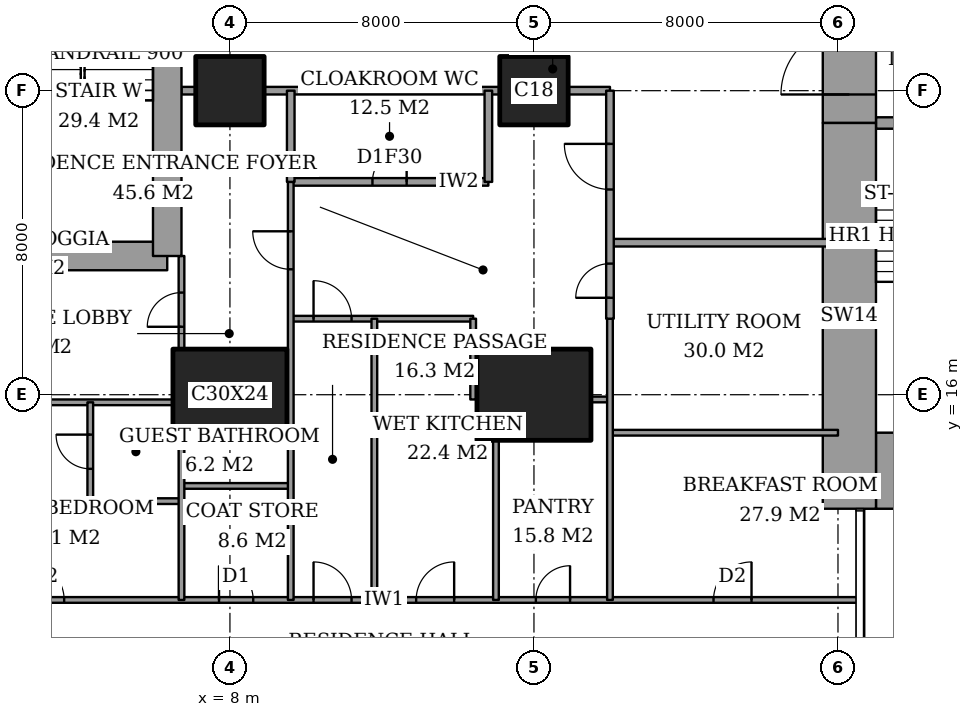
"""IFC4 building model, lengths in metres.
Left out: names, types, materials, properties, quantities, classifications, styles, units other than length and angle.
Written with IfcOpenShell. Run it as: python <this file> out.ifc"""

import sys

from ifc_helpers import new_model, si_unit, direction, frame, frame_2d, origin, origin_2d, place, context, subcontext, project, spatial, rectangle, extrude, element, fill, save


model = new_model("IFC4")
c1 = context("Model", 3, precision=1e-05, world=origin(), true_north=direction((0.0, 1.0)))
c2 = subcontext(c1, "Body", "Model", "MODEL_VIEW")
j1 = project(units=[si_unit("LENGTHUNIT", "METRE"), si_unit("PLANEANGLEUNIT", "RADIAN")], contexts=[c1])
p1 = place(None, origin())
s1 = spatial("IfcSite", under=j1, at=p1, CompositionType="ELEMENT")
p2 = place(p1, origin())
s2 = spatial("IfcBuilding", under=s1, at=p2, CompositionType="ELEMENT")
p3 = place(p2, frame((0.0, 0.0, 214.6)))
s3 = spatial("IfcBuildingStorey", under=s2, at=p3, CompositionType="ELEMENT", Elevation=214.6)
p4 = place(p3, frame((8.0, 16.0, 0.0), z_axis=(0.0, 0.0, 1.0), x_axis=(1.0, 0.0, 0.0)))
e1 = element("IfcColumn", 1, at=p4, inside=s3, PredefinedType="COLUMN", context=c2, shape_type="SweptSolid", body=[
    extrude(rectangle(XDim=3.0, YDim=2.4, at=origin_2d()), origin(), (0.0, 0.0, 1.0), 3.6),
])
p5 = place(p3, frame((8.0, 24.0, 0.0), z_axis=(0.0, 0.0, 1.0), x_axis=(1.0, 0.0, 0.0)))
e2 = element("IfcColumn", 2, at=p5, inside=s3, PredefinedType="COLUMN", context=c2, shape_type="SweptSolid", body=[
    extrude(rectangle(XDim=1.8, YDim=1.8, at=origin_2d()), origin(), (0.0, 0.0, 1.0), 3.6),
])
p6 = place(p3, frame((16.0, 16.0, 0.0), z_axis=(0.0, 0.0, 1.0), x_axis=(1.0, 0.0, 0.0)))
e3 = element("IfcColumn", 3, at=p6, inside=s3, PredefinedType="COLUMN", context=c2, shape_type="SweptSolid", body=[
    extrude(rectangle(XDim=3.0, YDim=2.4, at=origin_2d()), origin(), (0.0, 0.0, 1.0), 3.6),
])
p7 = place(p3, frame((16.0, 24.0, 0.0), z_axis=(0.0, 0.0, 1.0), x_axis=(1.0, 0.0, 0.0)))
e4 = element("IfcColumn", 4, at=p7, inside=s3, PredefinedType="COLUMN", context=c2, shape_type="SweptSolid", body=[
    extrude(rectangle(XDim=1.8, YDim=1.8, at=origin_2d()), origin(), (0.0, 0.0, 1.0), 3.6),
])
p8 = place(p3, frame((25.0, 14.0, 0.0), z_axis=(0.0, 0.0, 1.0), x_axis=(1.0, 0.0, 0.0)))
e5 = element("IfcWall", 5, at=p8, inside=s3, PredefinedType="SHEAR", context=c2, shape_type="SweptSolid", body=[
    extrude(rectangle(XDim=3.15, YDim=2.0, at=frame_2d((1.575, 0.0))), origin(), (0.0, 0.0, 1.0), 3.6),
])
p9 = place(p3, frame((24.3, 13.0, 0.0), z_axis=(0.0, 0.0, 1.0), x_axis=(0.0, 1.0, 0.0)))
e6 = element("IfcWall", 6, at=p9, inside=s3, PredefinedType="SHEAR", context=c2, shape_type="SweptSolid", body=[
    extrude(rectangle(XDim=10.15, YDim=1.4, at=frame_2d((5.075, 0.0))), origin(), (0.0, 0.0, 1.0), 3.6),
])
p10 = place(p3, frame((24.3, 23.15, 0.0), z_axis=(0.0, 0.0, 1.0), x_axis=(0.0, 1.0, 0.0)))
e7 = element("IfcWall", 7, at=p10, inside=s3, PredefinedType="SHEAR", context=c2, shape_type="SweptSolid", body=[
    extrude(rectangle(XDim=11.85, YDim=1.4, at=frame_2d((5.925, 0.0))), origin(), (0.0, 0.0, 1.0), 3.6),
])
p11 = place(p10, frame((0.75, 0.0, 0.0)))
e8 = element("IfcOpeningElement", 8, at=p11, cuts=e7, PredefinedType="OPENING", context=c2, shape_type="SweptSolid", body=[
    extrude(rectangle(XDim=1.8, YDim=2.4, at=frame_2d((0.9, 1.2))), frame((0.0, 0.71, 0.0), z_axis=(0.0, -1.0, 0.0), x_axis=(1.0, 0.0, 0.0)), (0.0, 0.0, 1.0), 1.42),
])
p12 = place(p3, frame((25.0, 23.15, 0.0), z_axis=(0.0, 0.0, 1.0), x_axis=(1.0, 0.0, 0.0)))
e9 = element("IfcWall", 9, at=p12, inside=s3, PredefinedType="SHEAR", context=c2, shape_type="SweptSolid", body=[
    extrude(rectangle(XDim=3.15, YDim=0.3, at=frame_2d((1.575, 0.0))), origin(), (0.0, 0.0, 1.0), 3.6),
])
p13 = place(p12, frame((0.6, 0.0, 0.0)))
e10 = element("IfcOpeningElement", 10, at=p13, cuts=e9, PredefinedType="OPENING", context=c2, shape_type="SweptSolid", body=[
    extrude(rectangle(XDim=1.0, YDim=2.1, at=frame_2d((0.5, 1.05))), frame((0.0, 0.16, 0.0), z_axis=(0.0, -1.0, 0.0), x_axis=(1.0, 0.0, 0.0)), (0.0, 0.0, 1.0), 0.32),
])
p14 = place(p3, frame((1.9, 19.65, 0.0), z_axis=(0.0, 0.0, 1.0), x_axis=(1.0, 0.0, 0.0)))
e11 = element("IfcWall", 11, at=p14, inside=s3, PredefinedType="SHEAR", context=c2, shape_type="SweptSolid", body=[
    extrude(rectangle(XDim=4.45, YDim=0.75, at=frame_2d((2.225, 0.0))), origin(), (0.0, 0.0, 1.0), 3.6),
])
p15 = place(p3, frame((6.35, 19.65, 0.0), z_axis=(0.0, 0.0, 1.0), x_axis=(0.0, 1.0, 0.0)))
e12 = element("IfcWall", 12, at=p15, inside=s3, PredefinedType="SHEAR", context=c2, shape_type="SweptSolid", body=[
    extrude(rectangle(XDim=8.7, YDim=0.75, at=frame_2d((4.35, 0.0))), origin(), (0.0, 0.0, 1.0), 3.6),
])
p16 = place(p15, frame((6.725, 0.0, 0.0)))
e13 = element("IfcOpeningElement", 13, at=p16, cuts=e12, PredefinedType="OPENING", context=c2, shape_type="SweptSolid", body=[
    extrude(rectangle(XDim=1.0, YDim=2.1, at=frame_2d((0.5, 1.05))), frame((0.0, 0.385, 0.0), z_axis=(0.0, -1.0, 0.0), x_axis=(1.0, 0.0, 0.0)), (0.0, 0.0, 1.0), 0.77),
])
p17 = place(p3, frame((-0.45, 10.6, 0.0), z_axis=(0.0, 0.0, 1.0), x_axis=(1.0, 0.0, 0.0)))
e14 = element("IfcWall", 14, at=p17, inside=s3, PredefinedType="PARTITIONING", context=c2, shape_type="SweptSolid", body=[
    extrude(rectangle(XDim=25.011, YDim=0.15, at=frame_2d((12.505, 0.0))), origin(), (0.0, 0.0, 1.0), 3.35),
])
p18 = place(p17, frame((10.65, 0.0, 0.0)))
e15 = element("IfcOpeningElement", 15, at=p18, cuts=e14, PredefinedType="OPENING", context=c2, shape_type="SweptSolid", body=[
    extrude(rectangle(XDim=1.0, YDim=2.1, at=frame_2d((0.5, 1.05))), frame((0.0, 0.085, 0.0), z_axis=(0.0, -1.0, 0.0), x_axis=(1.0, 0.0, 0.0)), (0.0, 0.0, 1.0), 0.17),
])
p19 = place(p17, frame((3.087, 0.0, 0.0)))
e16 = element("IfcOpeningElement", 16, at=p19, cuts=e14, PredefinedType="OPENING", context=c2, shape_type="SweptSolid", body=[
    extrude(rectangle(XDim=1.0, YDim=2.1, at=frame_2d((0.5, 1.05))), frame((0.0, 0.085, 0.0), z_axis=(0.0, -1.0, 0.0), x_axis=(1.0, 0.0, 0.0)), (0.0, 0.0, 1.0), 0.17),
])
p20 = place(p17, frame((8.163, 0.0, 0.0)))
e17 = element("IfcOpeningElement", 17, at=p20, cuts=e14, PredefinedType="OPENING", context=c2, shape_type="SweptSolid", body=[
    extrude(rectangle(XDim=0.9, YDim=2.1, at=frame_2d((0.45, 1.05))), frame((0.0, 0.085, 0.0), z_axis=(0.0, -1.0, 0.0), x_axis=(1.0, 0.0, 0.0)), (0.0, 0.0, 1.0), 0.17),
])
p21 = place(p17, frame((13.35, 0.0, 0.0)))
e18 = element("IfcOpeningElement", 18, at=p21, cuts=e14, PredefinedType="OPENING", context=c2, shape_type="SweptSolid", body=[
    extrude(rectangle(XDim=1.0, YDim=2.1, at=frame_2d((0.5, 1.05))), frame((0.0, 0.085, 0.0), z_axis=(0.0, -1.0, 0.0), x_axis=(1.0, 0.0, 0.0)), (0.0, 0.0, 1.0), 0.17),
])
p22 = place(p17, frame((16.5, 0.0, 0.0)))
e19 = element("IfcOpeningElement", 19, at=p22, cuts=e14, PredefinedType="OPENING", context=c2, shape_type="SweptSolid", body=[
    extrude(rectangle(XDim=0.9, YDim=2.1, at=frame_2d((0.45, 1.05))), frame((0.0, 0.085, 0.0), z_axis=(0.0, -1.0, 0.0), x_axis=(1.0, 0.0, 0.0)), (0.0, 0.0, 1.0), 0.17),
])
p23 = place(p17, frame((21.175, 0.0, 0.0)))
e20 = element("IfcOpeningElement", 20, at=p23, cuts=e14, PredefinedType="OPENING", context=c2, shape_type="SweptSolid", body=[
    extrude(rectangle(XDim=1.0, YDim=2.1, at=frame_2d((0.5, 1.05))), frame((0.0, 0.085, 0.0), z_axis=(0.0, -1.0, 0.0), x_axis=(1.0, 0.0, 0.0)), (0.0, 0.0, 1.0), 0.17),
])
p24 = place(p3, frame((4.325, 13.2, 0.0), z_axis=(0.0, 0.0, 1.0), x_axis=(1.0, 0.0, 0.0)))
e21 = element("IfcWall", 21, at=p24, inside=s3, PredefinedType="PARTITIONING", context=c2, shape_type="SweptSolid", body=[
    extrude(rectangle(XDim=2.4, YDim=0.15, at=frame_2d((1.2, 0.0))), origin(), (0.0, 0.0, 1.0), 3.35),
])
p25 = place(p3, frame((6.725, 13.6, 0.0), z_axis=(0.0, 0.0, 1.0), x_axis=(1.0, 0.0, 0.0)))
e22 = element("IfcWall", 22, at=p25, inside=s3, PredefinedType="PARTITIONING", context=c2, shape_type="SweptSolid", body=[
    extrude(rectangle(XDim=2.875, YDim=0.15, at=frame_2d((1.438, 0.0))), origin(), (0.0, 0.0, 1.0), 3.35),
])
p26 = place(p3, frame((18.0, 15.0, 0.0), z_axis=(0.0, 0.0, 1.0), x_axis=(1.0, 0.0, 0.0)))
e23 = element("IfcWall", 23, at=p26, inside=s3, PredefinedType="PARTITIONING", context=c2, shape_type="SweptSolid", body=[
    extrude(rectangle(XDim=6.0, YDim=0.15, at=frame_2d((3.0, 0.0))), origin(), (0.0, 0.0, 1.0), 3.35),
])
p27 = place(p3, frame((1.25, 15.8, 0.0), z_axis=(0.0, 0.0, 1.0), x_axis=(1.0, 0.0, 0.0)))
e24 = element("IfcWall", 24, at=p27, inside=s3, PredefinedType="PARTITIONING", context=c2, shape_type="SweptSolid", body=[
    extrude(rectangle(XDim=5.25, YDim=0.15, at=frame_2d((2.625, 0.0))), origin(), (0.0, 0.0, 1.0), 3.35),
])
p28 = place(p3, frame((17.5, 15.875, 0.0), z_axis=(0.0, 0.0, 1.0), x_axis=(1.0, 0.0, 0.0)))
e25 = element("IfcWall", 25, at=p28, inside=s3, PredefinedType="PARTITIONING", context=c2, shape_type="SweptSolid", body=[
    extrude(rectangle(XDim=0.5, YDim=0.15, at=frame_2d((0.25, 0.0))), origin(), (0.0, 0.0, 1.0), 2.634),
])
p29 = place(p3, frame((9.6, 18.0, 0.0), z_axis=(0.0, 0.0, 1.0), x_axis=(1.0, 0.0, 0.0)))
e26 = element("IfcWall", 26, at=p29, inside=s3, PredefinedType="PARTITIONING", context=c2, shape_type="SweptSolid", body=[
    extrude(rectangle(XDim=4.8, YDim=0.15, at=frame_2d((2.4, 0.0))), origin(), (0.0, 0.0, 1.0), 3.35),
])
p30 = place(p29, frame((0.6, 0.0, 0.0)))
e27 = element("IfcOpeningElement", 27, at=p30, cuts=e26, PredefinedType="OPENING", context=c2, shape_type="SweptSolid", body=[
    extrude(rectangle(XDim=1.0, YDim=2.1, at=frame_2d((0.5, 1.05))), frame((0.0, 0.085, 0.0), z_axis=(0.0, -1.0, 0.0), x_axis=(1.0, 0.0, 0.0)), (0.0, 0.0, 1.0), 0.17),
])
p31 = place(p3, frame((18.0, 20.0, 0.0), z_axis=(0.0, 0.0, 1.0), x_axis=(1.0, 0.0, 0.0)))
e28 = element("IfcWall", 28, at=p31, inside=s3, PredefinedType="PARTITIONING", context=c2, shape_type="SweptSolid", body=[
    extrude(rectangle(XDim=6.0, YDim=0.2, at=frame_2d((3.0, 0.0))), origin(), (0.0, 0.0, 1.0), 3.35),
])
p32 = place(p3, frame((9.6, 21.6, 0.0), z_axis=(0.0, 0.0, 1.0), x_axis=(1.0, 0.0, 0.0)))
e29 = element("IfcWall", 29, at=p32, inside=s3, PredefinedType="PARTITIONING", context=c2, shape_type="SweptSolid", body=[
    extrude(rectangle(XDim=5.2, YDim=0.2, at=frame_2d((2.6, 0.0))), origin(), (0.0, 0.0, 1.0), 3.35),
])
p33 = place(p32, frame((2.15, 0.0, 0.0)))
e30 = element("IfcOpeningElement", 30, at=p33, cuts=e29, PredefinedType="OPENING", context=c2, shape_type="SweptSolid", body=[
    extrude(rectangle(XDim=0.9, YDim=2.1, at=frame_2d((0.45, 1.05))), frame((0.0, 0.11, 0.0), z_axis=(0.0, -1.0, 0.0), x_axis=(1.0, 0.0, 0.0)), (0.0, 0.0, 1.0), 0.22),
])
p34 = place(p3, frame((6.725, 24.0, 0.0), z_axis=(0.0, 0.0, 1.0), x_axis=(1.0, 0.0, 0.0)))
e31 = element("IfcWall", 31, at=p34, inside=s3, PredefinedType="PARTITIONING", context=c2, shape_type="SweptSolid", body=[
    extrude(rectangle(XDim=0.375, YDim=0.2, at=frame_2d((0.188, 0.0))), origin(), (0.0, 0.0, 1.0), 3.35),
])
p35 = place(p3, frame((8.9, 24.0, 0.0), z_axis=(0.0, 0.0, 1.0), x_axis=(1.0, 0.0, 0.0)))
e32 = element("IfcWall", 32, at=p35, inside=s3, PredefinedType="PARTITIONING", context=c2, shape_type="SweptSolid", body=[
    extrude(rectangle(XDim=6.2, YDim=0.2, at=frame_2d((3.1, 0.0))), origin(), (0.0, 0.0, 1.0), 3.35),
])
p36 = place(p3, frame((16.9, 24.0, 0.0), z_axis=(0.0, 0.0, 1.0), x_axis=(1.0, 0.0, 0.0)))
e33 = element("IfcWall", 33, at=p36, inside=s3, PredefinedType="PARTITIONING", context=c2, shape_type="SweptSolid", body=[
    extrude(rectangle(XDim=1.1, YDim=0.2, at=frame_2d((0.55, 0.0))), origin(), (0.0, 0.0, 1.0), 3.35),
])
p37 = place(p3, frame((4.325, 13.2, 0.0), z_axis=(0.0, 0.0, 1.0), x_axis=(0.0, 1.0, 0.0)))
e34 = element("IfcWall", 34, at=p37, inside=s3, PredefinedType="PARTITIONING", context=c2, shape_type="SweptSolid", body=[
    extrude(rectangle(XDim=2.6, YDim=0.15, at=frame_2d((1.3, 0.0))), origin(), (0.0, 0.0, 1.0), 3.35),
])
p38 = place(p37, frame((0.85, 0.0, 0.0)))
e35 = element("IfcOpeningElement", 35, at=p38, cuts=e34, PredefinedType="OPENING", context=c2, shape_type="SweptSolid", body=[
    extrude(rectangle(XDim=0.9, YDim=2.1, at=frame_2d((0.45, 1.05))), frame((0.0, 0.085, 0.0), z_axis=(0.0, -1.0, 0.0), x_axis=(1.0, 0.0, 0.0)), (0.0, 0.0, 1.0), 0.17),
])
p39 = place(p3, frame((6.725, 10.6, 0.0), z_axis=(0.0, 0.0, 1.0), x_axis=(0.0, 1.0, 0.0)))
e36 = element("IfcWall", 36, at=p39, inside=s3, PredefinedType="PARTITIONING", context=c2, shape_type="SweptSolid", body=[
    extrude(rectangle(XDim=4.2, YDim=0.15, at=frame_2d((2.1, 0.0))), origin(), (0.0, 0.0, 1.0), 3.35),
])
p40 = place(p3, frame((6.725, 17.2, 0.0), z_axis=(0.0, 0.0, 1.0), x_axis=(0.0, 1.0, 0.0)))
e37 = element("IfcWall", 37, at=p40, inside=s3, PredefinedType="PARTITIONING", context=c2, shape_type="SweptSolid", body=[
    extrude(rectangle(XDim=2.45, YDim=0.15, at=frame_2d((1.225, 0.0))), origin(), (0.0, 0.0, 1.0), 3.35),
])
p41 = place(p40, frame((0.587, 0.0, 0.0)))
e38 = element("IfcOpeningElement", 38, at=p41, cuts=e37, PredefinedType="OPENING", context=c2, shape_type="SweptSolid", body=[
    extrude(rectangle(XDim=0.9, YDim=2.1, at=frame_2d((0.45, 1.05))), frame((0.0, 0.085, 0.0), z_axis=(0.0, -1.0, 0.0), x_axis=(1.0, 0.0, 0.0)), (0.0, 0.0, 1.0), 0.17),
])
p42 = place(p3, frame((9.6, 21.6, 0.0), z_axis=(0.0, 0.0, 1.0), x_axis=(0.0, 1.0, 0.0)))
e39 = element("IfcWall", 39, at=p42, inside=s3, PredefinedType="PARTITIONING", context=c2, shape_type="SweptSolid", body=[
    extrude(rectangle(XDim=2.4, YDim=0.2, at=frame_2d((1.2, 0.0))), origin(), (0.0, 0.0, 1.0), 3.35),
])
p43 = place(p3, frame((9.6, 10.6, 0.0), z_axis=(0.0, 0.0, 1.0), x_axis=(0.0, 1.0, 0.0)))
e40 = element("IfcWall", 40, at=p43, inside=s3, PredefinedType="PARTITIONING", context=c2, shape_type="SweptSolid", body=[
    extrude(rectangle(XDim=11.0, YDim=0.15, at=frame_2d((5.5, 0.0))), origin(), (0.0, 0.0, 1.0), 3.35),
])
p44 = place(p43, frame((8.7, 0.0, 0.0)))
e41 = element("IfcOpeningElement", 41, at=p44, cuts=e40, PredefinedType="OPENING", context=c2, shape_type="SweptSolid", body=[
    extrude(rectangle(XDim=1.0, YDim=2.1, at=frame_2d((0.5, 1.05))), frame((0.0, 0.085, 0.0), z_axis=(0.0, -1.0, 0.0), x_axis=(1.0, 0.0, 0.0)), (0.0, 0.0, 1.0), 0.17),
])
p45 = place(p3, frame((11.8, 10.6, 0.0), z_axis=(0.0, 0.0, 1.0), x_axis=(0.0, 1.0, 0.0)))
e42 = element("IfcWall", 42, at=p45, inside=s3, PredefinedType="PARTITIONING", context=c2, shape_type="SweptSolid", body=[
    extrude(rectangle(XDim=7.4, YDim=0.15, at=frame_2d((3.7, 0.0))), origin(), (0.0, 0.0, 1.0), 3.35),
])
p46 = place(p3, frame((14.4, 15.875, 0.0), z_axis=(0.0, 0.0, 1.0), x_axis=(0.0, 1.0, 0.0)))
e43 = element("IfcWall", 43, at=p46, inside=s3, PredefinedType="PARTITIONING", context=c2, shape_type="SweptSolid", body=[
    extrude(rectangle(XDim=2.125, YDim=0.15, at=frame_2d((1.062, 0.0))), origin(), (0.0, 0.0, 1.0), 3.35),
])
p47 = place(p3, frame((14.8, 21.6, 0.0), z_axis=(0.0, 0.0, 1.0), x_axis=(0.0, 1.0, 0.0)))
e44 = element("IfcWall", 44, at=p47, inside=s3, PredefinedType="PARTITIONING", context=c2, shape_type="SweptSolid", body=[
    extrude(rectangle(XDim=2.4, YDim=0.2, at=frame_2d((1.2, 0.0))), origin(), (0.0, 0.0, 1.0), 3.35),
])
p48 = place(p3, frame((15.0, 10.6, 0.0), z_axis=(0.0, 0.0, 1.0), x_axis=(0.0, 1.0, 0.0)))
e45 = element("IfcWall", 45, at=p48, inside=s3, PredefinedType="PARTITIONING", context=c2, shape_type="SweptSolid", body=[
    extrude(rectangle(XDim=4.2, YDim=0.15, at=frame_2d((2.1, 0.0))), origin(), (0.0, 0.0, 1.0), 3.35),
])
p49 = place(p3, frame((18.0, 18.0, 0.0), z_axis=(0.0, 0.0, 1.0), x_axis=(0.0, 1.0, 0.0)))
e46 = element("IfcWall", 46, at=p49, inside=s3, PredefinedType="PARTITIONING", context=c2, shape_type="SweptSolid", body=[
    extrude(rectangle(XDim=6.0, YDim=0.2, at=frame_2d((3.0, 0.0))), origin(), (0.0, 0.0, 1.0), 3.35),
])
p50 = place(p49, frame((3.4, 0.0, 0.0)))
e47 = element("IfcOpeningElement", 47, at=p50, cuts=e46, PredefinedType="OPENING", context=c2, shape_type="SweptSolid", body=[
    extrude(rectangle(XDim=1.2, YDim=2.4, at=frame_2d((0.6, 1.2))), frame((0.0, 0.11, 0.0), z_axis=(0.0, -1.0, 0.0), x_axis=(1.0, 0.0, 0.0)), (0.0, 0.0, 1.0), 0.22),
])
p51 = place(p49, frame((0.55, 0.0, 0.0)))
e48 = element("IfcOpeningElement", 48, at=p51, cuts=e46, PredefinedType="OPENING", context=c2, shape_type="SweptSolid", body=[
    extrude(rectangle(XDim=0.9, YDim=2.1, at=frame_2d((0.45, 1.05))), frame((0.0, 0.11, 0.0), z_axis=(0.0, -1.0, 0.0), x_axis=(1.0, 0.0, 0.0)), (0.0, 0.0, 1.0), 0.22),
])
p52 = place(p3, frame((18.0, 10.6, 0.0), z_axis=(0.0, 0.0, 1.0), x_axis=(0.0, 1.0, 0.0)))
e49 = element("IfcWall", 49, at=p52, inside=s3, PredefinedType="PARTITIONING", context=c2, shape_type="SweptSolid", body=[
    extrude(rectangle(XDim=7.4, YDim=0.15, at=frame_2d((3.7, 0.0))), origin(), (0.0, 0.0, 1.0), 3.35),
])
p53 = place(p18, origin())
e50 = element("IfcDoor", 50, at=p53, inside=s3, OperationType="SINGLE_SWING_RIGHT", PredefinedType="DOOR", context=c2, shape_type="SweptSolid", body=[
    extrude(rectangle(XDim=1.0, YDim=2.1, at=frame_2d((0.5, 1.05))), frame((0.0, 0.025, 0.0), z_axis=(0.0, -1.0, 0.0), x_axis=(1.0, 0.0, 0.0)), (0.0, 0.0, 1.0), 0.05),
])
fill(e15, e50)
p54 = place(p38, origin())
e51 = element("IfcDoor", 51, at=p54, inside=s3, OperationType="SINGLE_SWING_LEFT", PredefinedType="DOOR", context=c2, shape_type="SweptSolid", body=[
    extrude(rectangle(XDim=0.9, YDim=2.1, at=frame_2d((0.45, 1.05))), frame((0.0, 0.025, 0.0), z_axis=(0.0, -1.0, 0.0), x_axis=(1.0, 0.0, 0.0)), (0.0, 0.0, 1.0), 0.05),
])
fill(e35, e51)
p55 = place(p19, origin())
e52 = element("IfcDoor", 52, at=p55, inside=s3, OperationType="SINGLE_SWING_RIGHT", PredefinedType="DOOR", context=c2, shape_type="SweptSolid", body=[
    extrude(rectangle(XDim=1.0, YDim=2.1, at=frame_2d((0.5, 1.05))), frame((0.0, 0.025, 0.0), z_axis=(0.0, -1.0, 0.0), x_axis=(1.0, 0.0, 0.0)), (0.0, 0.0, 1.0), 0.05),
])
fill(e16, e52)
p56 = place(p41, origin())
e53 = element("IfcDoor", 53, at=p56, inside=s3, OperationType="SINGLE_SWING_RIGHT", PredefinedType="DOOR", context=c2, shape_type="SweptSolid", body=[
    extrude(rectangle(XDim=0.9, YDim=2.1, at=frame_2d((0.45, 1.05))), frame((0.0, 0.025, 0.0), z_axis=(0.0, -1.0, 0.0), x_axis=(1.0, 0.0, 0.0)), (0.0, 0.0, 1.0), 0.05),
])
fill(e38, e53)
p57 = place(p20, origin())
e54 = element("IfcDoor", 54, at=p57, inside=s3, OperationType="SINGLE_SWING_RIGHT", PredefinedType="DOOR", context=c2, shape_type="SweptSolid", body=[
    extrude(rectangle(XDim=0.9, YDim=2.1, at=frame_2d((0.45, 1.05))), frame((0.0, 0.025, 0.0), z_axis=(0.0, -1.0, 0.0), x_axis=(1.0, 0.0, 0.0)), (0.0, 0.0, 1.0), 0.05),
])
fill(e17, e54)
p58 = place(p44, origin())
e55 = element("IfcDoor", 55, at=p58, inside=s3, OperationType="SINGLE_SWING_LEFT", PredefinedType="DOOR", context=c2, shape_type="SweptSolid", body=[
    extrude(rectangle(XDim=1.0, YDim=2.1, at=frame_2d((0.5, 1.05))), frame((0.0, 0.025, 0.0), z_axis=(0.0, -1.0, 0.0), x_axis=(1.0, 0.0, 0.0)), (0.0, 0.0, 1.0), 0.05),
])
fill(e41, e55)
p59 = place(p33, origin())
e56 = element("IfcDoor", 56, at=p59, inside=s3, OperationType="SINGLE_SWING_LEFT", PredefinedType="DOOR", context=c2, shape_type="SweptSolid", body=[
    extrude(rectangle(XDim=0.9, YDim=2.1, at=frame_2d((0.45, 1.05))), frame((0.0, 0.025, 0.0), z_axis=(0.0, -1.0, 0.0), x_axis=(1.0, 0.0, 0.0)), (0.0, 0.0, 1.0), 0.05),
])
fill(e30, e56)
p60 = place(p50, origin())
e57 = element("IfcDoor", 57, at=p60, inside=s3, OperationType="SINGLE_SWING_LEFT", PredefinedType="DOOR", context=c2, shape_type="SweptSolid", body=[
    extrude(rectangle(XDim=1.2, YDim=2.4, at=frame_2d((0.6, 1.2))), frame((0.0, 0.025, 0.0), z_axis=(0.0, -1.0, 0.0), x_axis=(1.0, 0.0, 0.0)), (0.0, 0.0, 1.0), 0.05),
])
fill(e47, e57)
p61 = place(p30, origin())
e58 = element("IfcDoor", 58, at=p61, inside=s3, OperationType="SINGLE_SWING_RIGHT", PredefinedType="DOOR", context=c2, shape_type="SweptSolid", body=[
    extrude(rectangle(XDim=1.0, YDim=2.1, at=frame_2d((0.5, 1.05))), frame((0.0, 0.025, 0.0), z_axis=(0.0, -1.0, 0.0), x_axis=(1.0, 0.0, 0.0)), (0.0, 0.0, 1.0), 0.05),
])
fill(e27, e58)
p62 = place(p21, origin())
e59 = element("IfcDoor", 59, at=p62, inside=s3, OperationType="SINGLE_SWING_LEFT", PredefinedType="DOOR", context=c2, shape_type="SweptSolid", body=[
    extrude(rectangle(XDim=1.0, YDim=2.1, at=frame_2d((0.5, 1.05))), frame((0.0, 0.025, 0.0), z_axis=(0.0, -1.0, 0.0), x_axis=(1.0, 0.0, 0.0)), (0.0, 0.0, 1.0), 0.05),
])
fill(e18, e59)
p63 = place(p22, origin())
e60 = element("IfcDoor", 60, at=p63, inside=s3, OperationType="SINGLE_SWING_LEFT", PredefinedType="DOOR", context=c2, shape_type="SweptSolid", body=[
    extrude(rectangle(XDim=0.9, YDim=2.1, at=frame_2d((0.45, 1.05))), frame((0.0, 0.025, 0.0), z_axis=(0.0, -1.0, 0.0), x_axis=(1.0, 0.0, 0.0)), (0.0, 0.0, 1.0), 0.05),
])
fill(e19, e60)
p64 = place(p23, origin())
e61 = element("IfcDoor", 61, at=p64, inside=s3, OperationType="SINGLE_SWING_LEFT", PredefinedType="DOOR", context=c2, shape_type="SweptSolid", body=[
    extrude(rectangle(XDim=1.0, YDim=2.1, at=frame_2d((0.5, 1.05))), frame((0.0, 0.025, 0.0), z_axis=(0.0, -1.0, 0.0), x_axis=(1.0, 0.0, 0.0)), (0.0, 0.0, 1.0), 0.05),
])
fill(e20, e61)
p65 = place(p51, origin())
e62 = element("IfcDoor", 62, at=p65, inside=s3, OperationType="SINGLE_SWING_RIGHT", PredefinedType="DOOR", context=c2, shape_type="SweptSolid", body=[
    extrude(rectangle(XDim=0.9, YDim=2.1, at=frame_2d((0.45, 1.05))), frame((0.0, 0.025, 0.0), z_axis=(0.0, -1.0, 0.0), x_axis=(1.0, 0.0, 0.0)), (0.0, 0.0, 1.0), 0.05),
])
fill(e48, e62)
p66 = place(p11, origin())
e63 = element("IfcDoor", 63, at=p66, inside=s3, OperationType="DOUBLE_DOOR_DOUBLE_SWING", PredefinedType="DOOR", context=c2, shape_type="SweptSolid", body=[
    extrude(rectangle(XDim=1.8, YDim=2.4, at=frame_2d((0.9, 1.2))), frame((0.0, 0.025, 0.0), z_axis=(0.0, -1.0, 0.0), x_axis=(1.0, 0.0, 0.0)), (0.0, 0.0, 1.0), 0.05),
])
fill(e8, e63)
save(model, sys.argv[1])
